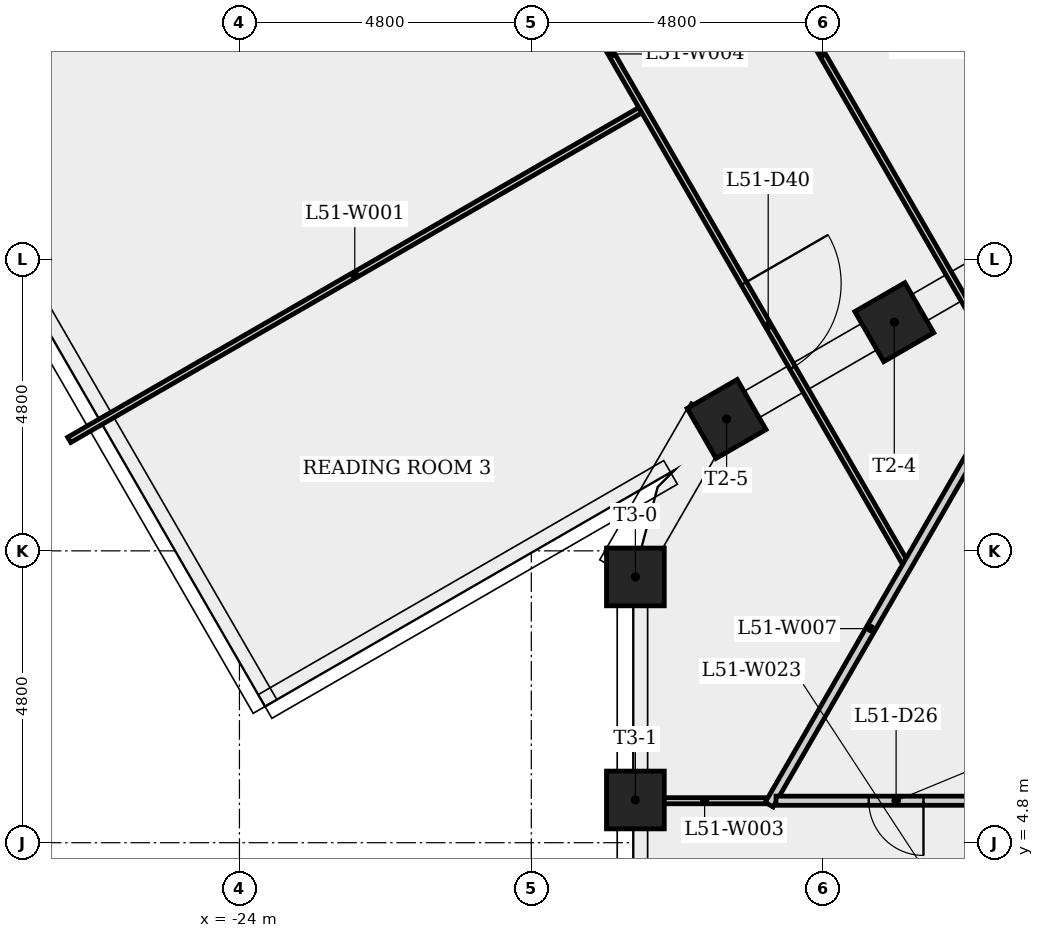
"""IFC4 building model, lengths in metres.
Left out: names, types, materials, properties, quantities, classifications, styles, units other than length and angle.
Written with IfcOpenShell. Run it as: python <this file> out.ifc"""

import sys

from ifc_helpers import new_model, si_unit, direction, frame, frame_2d, origin, origin_2d, place, context, subcontext, project, spatial, rectangle, extrude, element, fill, save


model = new_model("IFC4")
c1 = context("Model", 3, precision=1e-05, world=origin(), true_north=direction((0.0, 1.0)))
c2 = subcontext(c1, "Body", "Model", "MODEL_VIEW")
j1 = project(units=[si_unit("LENGTHUNIT", "METRE"), si_unit("PLANEANGLEUNIT", "RADIAN")], contexts=[c1])
p1 = place(None, origin())
s1 = spatial("IfcSite", under=j1, at=p1, CompositionType="ELEMENT")
p2 = place(p1, origin())
s2 = spatial("IfcBuilding", under=s1, at=p2, CompositionType="ELEMENT")
p3 = place(p2, frame((0.0, 0.0, 190.7)))
s3 = spatial("IfcBuildingStorey", under=s2, at=p3, CompositionType="ELEMENT", Elevation=190.7)
for number, where, z_axis, x_axis in (
    (1, (-13.23, 13.362, 0.0), (0.0, 0.0, 1.0), (-0.5, 0.866, 0.0)),
    (2, (-15.988, 11.769, 0.0), (0.0, 0.0, 1.0), (-0.5, 0.866, 0.0)),
    (3, (-17.488, 9.171, 0.0), (0.0, 0.0, 1.0), (-1.0, 0.0, 0.0)),
    (4, (-17.488, 5.503, 0.0), (0.0, 0.0, 1.0), (-1.0, 0.0, 0.0)),
):
    element("IfcColumn", number, at=place(p3, frame(where, z_axis=z_axis, x_axis=x_axis)), inside=s3, PredefinedType="COLUMN", context=c2, shape_type="SweptSolid", body=[
        extrude(rectangle(XDim=0.95, YDim=0.95, at=origin_2d()), origin(), (0.0, 0.0, 1.0), 4.0),
    ])
p4 = place(p3, frame((-26.799, 11.426, 0.0), z_axis=(0.0, 0.0, 1.0), x_axis=(0.866016508643, 0.500015406521, 0.0)))
e5 = element("IfcWall", 5, at=p4, inside=s3, PredefinedType="PARTITIONING", context=c2, shape_type="SweptSolid", body=[
    extrude(rectangle(XDim=10.845, YDim=0.1, at=frame_2d((5.422, 0.0))), origin(), (0.0, 0.0, 1.0), 3.6),
])
p5 = place(p3, frame((-20.11, 27.629, 0.0), z_axis=(0.0, 0.0, 1.0), x_axis=(0.499998569178, -0.866026229868, 0.0)))
e6 = element("IfcWall", 6, at=p5, inside=s3, PredefinedType="PARTITIONING", context=c2, shape_type="SweptSolid", body=[
    extrude(rectangle(XDim=22.757, YDim=0.1, at=frame_2d((11.379, 0.0))), origin(), (0.0, 0.0, 1.0), 3.6),
])
p6 = place(p5, frame((18.635, 0.0, 0.0)))
e7 = element("IfcOpeningElement", 7, at=p6, cuts=e6, PredefinedType="OPENING", context=c2, shape_type="SweptSolid", body=[
    extrude(rectangle(XDim=1.6, YDim=2.1, at=frame_2d((0.8, 1.05))), frame((0.0, 0.06, 0.0), z_axis=(0.0, -1.0, 0.0), x_axis=(1.0, 0.0, 0.0)), (0.0, 0.0, 1.0), 0.12),
])
p7 = place(p5, frame((3.535, 0.0, 0.0)))
e8 = element("IfcOpeningElement", 8, at=p7, cuts=e6, PredefinedType="OPENING", context=c2, shape_type="SweptSolid", body=[
    extrude(rectangle(XDim=1.6, YDim=2.1, at=frame_2d((0.8, 1.05))), frame((0.0, 0.06, 0.0), z_axis=(0.0, -1.0, 0.0), x_axis=(1.0, 0.0, 0.0)), (0.0, 0.0, 1.0), 0.12),
])
p8 = place(p3, frame((-17.373, 5.49, 0.0), z_axis=(0.0, 0.0, 1.0), x_axis=(1.0, 0.0, 0.0)))
e9 = element("IfcWall", 9, at=p8, inside=s3, PredefinedType="PARTITIONING", context=c2, shape_type="SweptSolid", body=[
    extrude(rectangle(XDim=2.048, YDim=0.1, at=frame_2d((1.024, 0.0))), origin(), (0.0, 0.0, 1.0), 3.6),
])
p9 = place(p3, frame((-22.708, 26.129, 0.0), z_axis=(0.0, 0.0, 1.0), x_axis=(0.500000613642, -0.866025049498, 0.0)))
e10 = element("IfcWall", 10, at=p9, inside=s3, PredefinedType="PARTITIONING", context=c2, shape_type="SweptSolid", body=[
    extrude(rectangle(XDim=19.298, YDim=0.1, at=frame_2d((9.649, 0.0))), origin(), (0.0, 0.0, 1.0), 3.6),
])
p10 = place(p9, frame((14.008, 0.0, 0.0)))
e11 = element("IfcOpeningElement", 11, at=p10, cuts=e10, PredefinedType="OPENING", context=c2, shape_type="SweptSolid", body=[
    extrude(rectangle(XDim=1.6, YDim=2.1, at=frame_2d((0.8, 1.05))), frame((0.0, 0.06, 0.0), z_axis=(0.0, -1.0, 0.0), x_axis=(1.0, 0.0, 0.0)), (0.0, 0.0, 1.0), 0.12),
])
p11 = place(p9, frame((4.902, 0.0, 0.0)))
e12 = element("IfcOpeningElement", 12, at=p11, cuts=e10, PredefinedType="OPENING", context=c2, shape_type="SweptSolid", body=[
    extrude(rectangle(XDim=1.6, YDim=2.1, at=frame_2d((0.8, 1.05))), frame((0.0, 0.06, 0.0), z_axis=(0.0, -1.0, 0.0), x_axis=(1.0, 0.0, 0.0)), (0.0, 0.0, 1.0), 0.12),
])
p12 = place(p3, frame((-15.288, 5.426, 0.0), z_axis=(0.0, 0.0, 1.0), x_axis=(0.499991080761, 0.866030553248, 0.0)))
e13 = element("IfcWall", 13, at=p12, inside=s3, PredefinedType="PARTITIONING", context=c2, shape_type="SweptSolid", body=[
    extrude(rectangle(XDim=6.687, YDim=0.15, at=frame_2d((3.344, 0.0))), origin(), (0.0, 0.0, 1.0), 3.6),
])
p13 = place(p3, frame((-12.755, 31.875, 0.0), z_axis=(0.0, 0.0, 1.0), x_axis=(0.49999367972, -0.866029052769, 0.0)))
e14 = element("IfcWall", 14, at=p13, inside=s3, PredefinedType="PARTITIONING", context=c2, shape_type="SweptSolid", body=[
    extrude(rectangle(XDim=18.311, YDim=0.1, at=frame_2d((9.155, 0.0))), origin(), (0.0, 0.0, 1.0), 3.6),
])
p14 = place(p13, frame((12.06, 0.0, 0.0)))
e15 = element("IfcOpeningElement", 15, at=p14, cuts=e14, PredefinedType="OPENING", context=c2, shape_type="SweptSolid", body=[
    extrude(rectangle(XDim=1.6, YDim=2.1, at=frame_2d((0.8, 1.05))), frame((0.0, 0.06, 0.0), z_axis=(0.0, -1.0, 0.0), x_axis=(1.0, 0.0, 0.0)), (0.0, 0.0, 1.0), 0.12),
])
p15 = place(p13, frame((7.093, 0.0, 0.0)))
e16 = element("IfcOpeningElement", 16, at=p15, cuts=e14, PredefinedType="OPENING", context=c2, shape_type="SweptSolid", body=[
    extrude(rectangle(XDim=1.6, YDim=2.1, at=frame_2d((0.8, 1.05))), frame((0.0, 0.06, 0.0), z_axis=(0.0, -1.0, 0.0), x_axis=(1.0, 0.0, 0.0)), (0.0, 0.0, 1.0), 0.12),
])
p16 = place(p13, frame((2.313, 0.0, 0.0)))
e17 = element("IfcOpeningElement", 17, at=p16, cuts=e14, PredefinedType="OPENING", context=c2, shape_type="SweptSolid", body=[
    extrude(rectangle(XDim=1.6, YDim=2.1, at=frame_2d((0.8, 1.05))), frame((0.0, 0.06, 0.0), z_axis=(0.0, -1.0, 0.0), x_axis=(1.0, 0.0, 0.0)), (0.0, 0.0, 1.0), 0.12),
])
p17 = place(p3, frame((-15.353, 30.375, 0.0), z_axis=(0.0, 0.0, 1.0), x_axis=(0.499998569178, -0.866026229868, 0.0)))
e18 = element("IfcWall", 18, at=p17, inside=s3, PredefinedType="PARTITIONING", context=c2, shape_type="SweptSolid", body=[
    extrude(rectangle(XDim=22.757, YDim=0.1, at=frame_2d((11.379, 0.0))), origin(), (0.0, 0.0, 1.0), 3.6),
])
p18 = place(p17, frame((11.219, 0.0, 0.0)))
e19 = element("IfcOpeningElement", 19, at=p18, cuts=e18, PredefinedType="OPENING", context=c2, shape_type="SweptSolid", body=[
    extrude(rectangle(XDim=1.6, YDim=2.1, at=frame_2d((0.8, 1.05))), frame((0.0, 0.06, 0.0), z_axis=(0.0, -1.0, 0.0), x_axis=(1.0, 0.0, 0.0)), (0.0, 0.0, 1.0), 0.12),
])
p19 = place(p3, frame((-11.225, 5.49, 0.0), z_axis=(0.0, 0.0, 1.0), x_axis=(-1.0, 0.0, 0.0)))
e20 = element("IfcWall", 20, at=p19, inside=s3, PredefinedType="PARTITIONING", context=c2, shape_type="SweptSolid", body=[
    extrude(rectangle(XDim=3.951, YDim=0.15, at=frame_2d((1.975, 0.0))), origin(), (0.0, 0.0, 1.0), 3.6),
])
p20 = place(p19, frame((1.525, 0.0, 0.0)))
e21 = element("IfcOpeningElement", 21, at=p20, cuts=e20, PredefinedType="OPENING", context=c2, shape_type="SweptSolid", body=[
    extrude(rectangle(XDim=0.9, YDim=2.1, at=frame_2d((0.45, 1.05))), frame((0.0, 0.085, 0.0), z_axis=(0.0, -1.0, 0.0), x_axis=(1.0, 0.0, 0.0)), (0.0, 0.0, 1.0), 0.17),
])
p21 = place(p20, origin())
e22 = element("IfcDoor", 22, at=p21, inside=s3, OperationType="SINGLE_SWING_LEFT", PredefinedType="DOOR", context=c2, shape_type="SweptSolid", body=[
    extrude(rectangle(XDim=0.9, YDim=2.1, at=frame_2d((0.45, 1.05))), frame((0.0, 0.025, 0.0), z_axis=(0.0, -1.0, 0.0), x_axis=(1.0, 0.0, 0.0)), (0.0, 0.0, 1.0), 0.05),
])
fill(e21, e22)
p22 = place(p10, origin())
e23 = element("IfcDoor", 23, at=p22, inside=s3, OperationType="SINGLE_SWING_LEFT", PredefinedType="DOOR", context=c2, shape_type="SweptSolid", body=[
    extrude(rectangle(XDim=1.6, YDim=2.1, at=frame_2d((0.8, 1.05))), frame((0.0, 0.025, 0.0), z_axis=(0.0, -1.0, 0.0), x_axis=(1.0, 0.0, 0.0)), (0.0, 0.0, 1.0), 0.05),
])
fill(e11, e23)
save(model, sys.argv[1])
